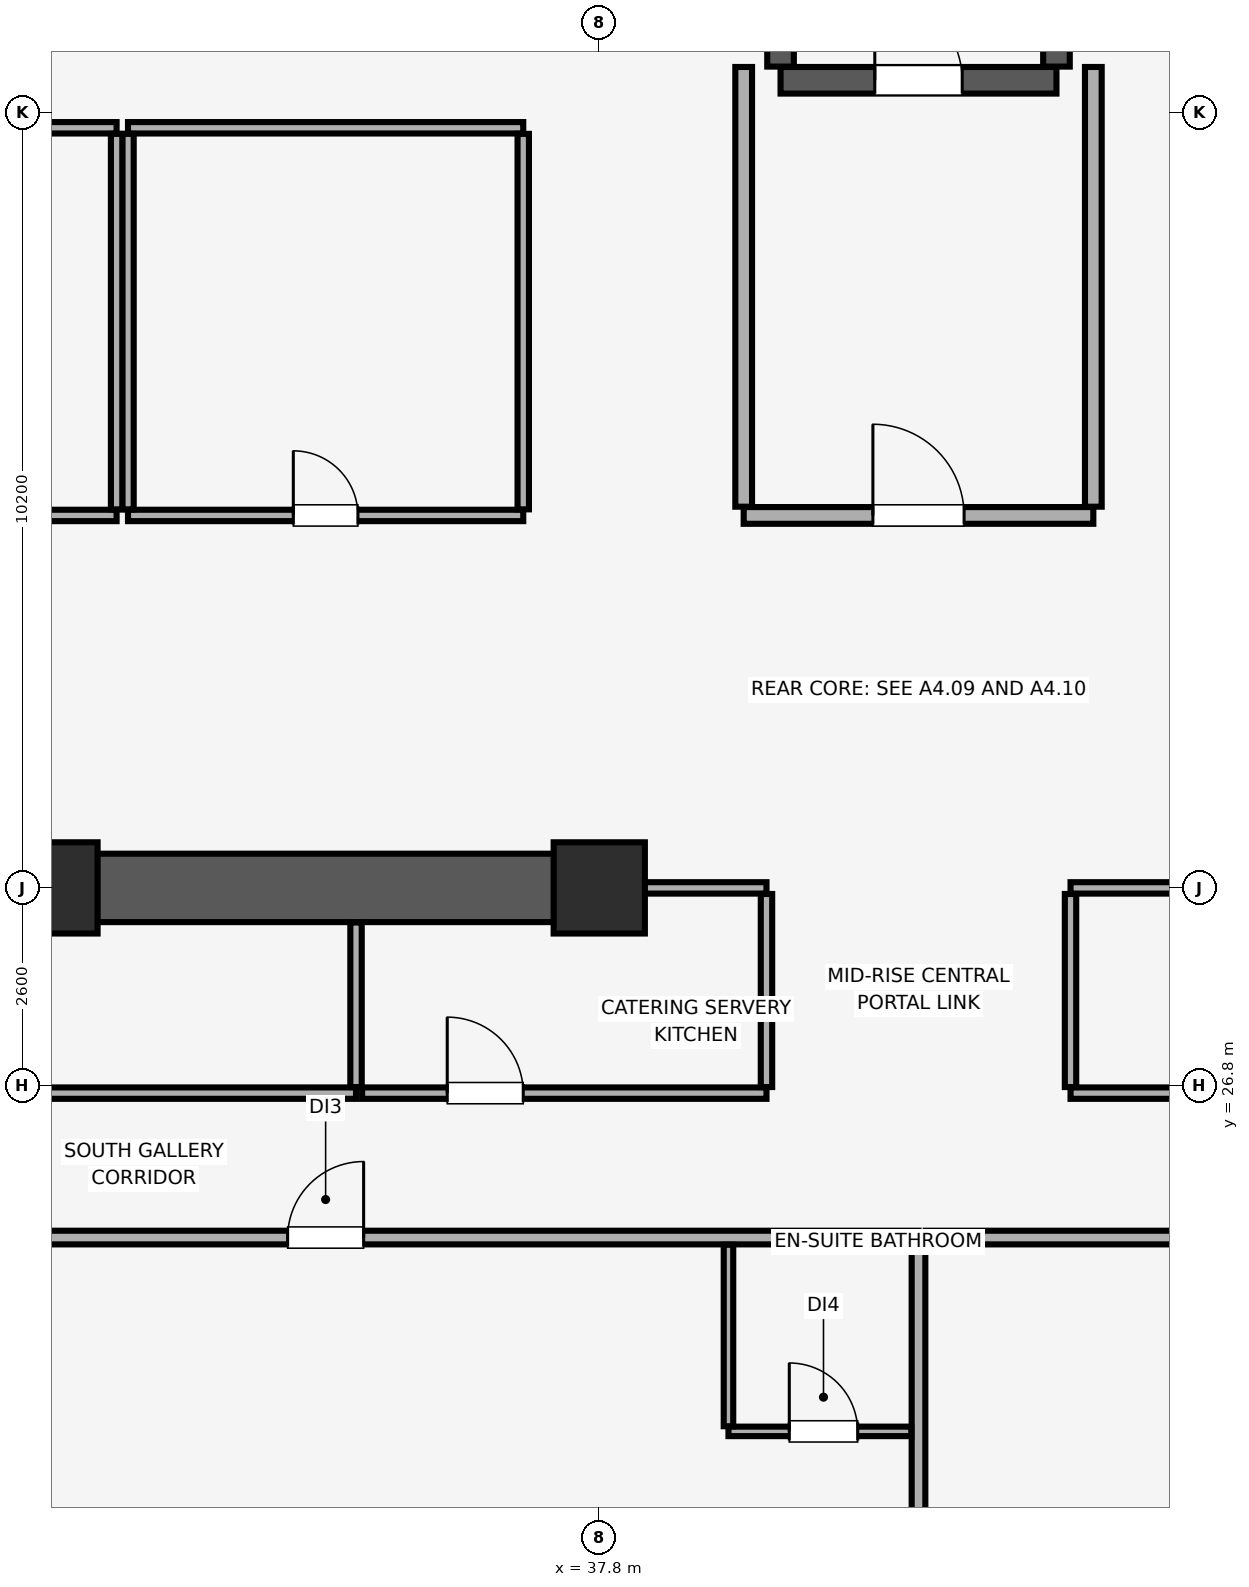
"""IFC4 building model, lengths in metres.
Left out: names, types, materials, properties, quantities, classifications, styles, units other than length and angle.
Written with IfcOpenShell. Run it as: python <this file> out.ifc"""

import sys

from ifc_helpers import new_model, si_unit, direction, frame, frame_2d, origin, origin_2d, place, context, subcontext, project, spatial, rectangle, extrude, element, fill, save


model = new_model("IFC4")
c1 = context("Model", 3, precision=1e-05, world=origin(), true_north=direction((0.0, 1.0)))
c2 = subcontext(c1, "Body", "Model", "MODEL_VIEW")
j1 = project(units=[si_unit("LENGTHUNIT", "METRE"), si_unit("PLANEANGLEUNIT", "RADIAN")], contexts=[c1])
p1 = place(None, origin())
s1 = spatial("IfcSite", under=j1, at=p1, CompositionType="ELEMENT")
p2 = place(p1, origin())
s2 = spatial("IfcBuilding", under=s1, at=p2, CompositionType="ELEMENT")
p3 = place(p2, frame((0.0, 0.0, 220.55)))
s3 = spatial("IfcBuildingStorey", under=s2, at=p3, CompositionType="ELEMENT", Elevation=220.55)
for number, where, z_axis, x_axis in (
    (1, (30.6, 29.4, 0.0), (0.0, 0.0, 1.0), (1.0, 0.0, 0.0)),
    (2, (37.8, 29.4, 0.0), (0.0, 0.0, 1.0), (1.0, 0.0, 0.0)),
):
    element("IfcColumn", number, at=place(p3, frame(where, z_axis=z_axis, x_axis=x_axis)), inside=s3, PredefinedType="COLUMN", context=c2, shape_type="SweptSolid", body=[
        extrude(rectangle(XDim=1.2, YDim=1.2, at=origin_2d()), origin(), (0.0, 0.0, 1.0), 3.56),
    ])
p4 = place(p3, frame((30.4, 29.4, 0.0), z_axis=(0.0, 0.0, 1.0), x_axis=(1.0, 0.0, 0.0)))
e3 = element("IfcWall", 3, at=p4, inside=s3, PredefinedType="SHEAR", context=c2, shape_type="SweptSolid", body=[
    extrude(rectangle(XDim=7.6, YDim=0.9, at=frame_2d((3.8, 0.0))), origin(), (0.0, 0.0, 1.0), 3.56),
])
p5 = place(p3, frame((40.185, 40.025, 0.0), z_axis=(0.0, 0.0, 1.0), x_axis=(1.0, 0.0, 0.0)))
e4 = element("IfcWall", 4, at=p5, inside=s3, PredefinedType="SHEAR", context=c2, shape_type="SweptSolid", body=[
    extrude(rectangle(XDim=3.63, YDim=0.35, at=frame_2d((1.815, 0.0))), origin(), (0.0, 0.0, 1.0), 3.56),
])
p6 = place(p5, frame((1.24, 0.0, 0.0)))
e5 = element("IfcOpeningElement", 5, at=p6, cuts=e4, PredefinedType="OPENING", context=c2, shape_type="SweptSolid", body=[
    extrude(rectangle(XDim=1.15, YDim=2.15, at=frame_2d((0.575, 1.075))), frame((0.0, 0.185, 0.0), z_axis=(0.0, -1.0, 0.0), x_axis=(1.0, 0.0, 0.0)), (0.0, 0.0, 1.0), 0.37),
])
for number, where, z_axis, x_axis in (
    (6, (40.185, 40.205, 0.0), (0.0, 0.0, 1.0), (0.0, 1.0, 0.0)),
    (7, (43.815, 40.205, 0.0), (0.0, 0.0, 1.0), (0.0, 1.0, 0.0)),
):
    element("IfcWall", number, at=place(p3, frame(where, z_axis=z_axis, x_axis=x_axis)), inside=s3, PredefinedType="SHEAR", context=c2, shape_type="SweptSolid", body=[
        extrude(rectangle(XDim=8.09, YDim=0.35, at=frame_2d((4.045, 0.0))), origin(), (0.0, 0.0, 1.0), 3.56),
    ])
p7 = place(p3, frame((39.7, 34.3, 0.0), z_axis=(0.0, 0.0, 1.0), x_axis=(1.0, 0.0, 0.0)))
e8 = element("IfcWall", 8, at=p7, inside=s3, PredefinedType="PARTITIONING", context=c2, shape_type="SweptSolid", body=[
    extrude(rectangle(XDim=4.6, YDim=0.22, at=frame_2d((2.3, 0.0))), origin(), (0.0, 0.0, 1.0), 3.56),
])
p8 = place(p7, frame((1.7, 0.0, 0.0)))
e9 = element("IfcOpeningElement", 9, at=p8, cuts=e8, PredefinedType="OPENING", context=c2, shape_type="SweptSolid", body=[
    extrude(rectangle(XDim=1.2, YDim=2.15, at=frame_2d((0.6, 1.075))), frame((0.0, 0.12, 0.0), z_axis=(0.0, -1.0, 0.0), x_axis=(1.0, 0.0, 0.0)), (0.0, 0.0, 1.0), 0.24),
])
for number, where, z_axis, x_axis in (
    (10, (39.7, 34.415, 0.0), (0.0, 0.0, 1.0), (0.0, 1.0, 0.0)),
    (11, (44.3, 34.415, 0.0), (0.0, 0.0, 1.0), (0.0, 1.0, 0.0)),
):
    element("IfcWall", number, at=place(p3, frame(where, z_axis=z_axis, x_axis=x_axis)), inside=s3, PredefinedType="PARTITIONING", context=c2, shape_type="SweptSolid", body=[
        extrude(rectangle(XDim=5.785, YDim=0.22, at=frame_2d((2.893, 0.0))), origin(), (0.0, 0.0, 1.0), 3.56),
    ])
p9 = place(p3, frame((31.6, 34.3, 0.0), z_axis=(0.0, 0.0, 1.0), x_axis=(1.0, 0.0, 0.0)))
e12 = element("IfcWall", 12, at=p9, inside=s3, PredefinedType="PARTITIONING", context=c2, shape_type="SweptSolid", body=[
    extrude(rectangle(XDim=5.2, YDim=0.15, at=frame_2d((2.6, 0.0))), origin(), (0.0, 0.0, 1.0), 3.56),
])
p10 = place(p9, frame((2.175, 0.0, 0.0)))
e13 = element("IfcOpeningElement", 13, at=p10, cuts=e12, PredefinedType="OPENING", context=c2, shape_type="SweptSolid", body=[
    extrude(rectangle(XDim=0.85, YDim=2.1, at=frame_2d((0.425, 1.05))), frame((0.0, 0.085, 0.0), z_axis=(0.0, -1.0, 0.0), x_axis=(1.0, 0.0, 0.0)), (0.0, 0.0, 1.0), 0.17),
])
p11 = place(p3, frame((31.6, 39.4, 0.0), z_axis=(0.0, 0.0, 1.0), x_axis=(1.0, 0.0, 0.0)))
e14 = element("IfcWall", 14, at=p11, inside=s3, PredefinedType="PARTITIONING", context=c2, shape_type="SweptSolid", body=[
    extrude(rectangle(XDim=5.2, YDim=0.15, at=frame_2d((2.6, 0.0))), origin(), (0.0, 0.0, 1.0), 3.56),
])
for number, where, z_axis, x_axis in (
    (15, (31.6, 34.38, 0.0), (0.0, 0.0, 1.0), (0.0, 1.0, 0.0)),
    (16, (36.8, 34.38, 0.0), (0.0, 0.0, 1.0), (0.0, 1.0, 0.0)),
):
    element("IfcWall", number, at=place(p3, frame(where, z_axis=z_axis, x_axis=x_axis)), inside=s3, PredefinedType="PARTITIONING", context=c2, shape_type="SweptSolid", body=[
        extrude(rectangle(XDim=4.94, YDim=0.15, at=frame_2d((2.47, 0.0))), origin(), (0.0, 0.0, 1.0), 3.56),
    ])
p12 = place(p3, frame((23.8, 34.3, 0.0), z_axis=(0.0, 0.0, 1.0), x_axis=(1.0, 0.0, 0.0)))
e17 = element("IfcWall", 17, at=p12, inside=s3, PredefinedType="PARTITIONING", context=c2, shape_type="SweptSolid", body=[
    extrude(rectangle(XDim=7.65, YDim=0.15, at=frame_2d((3.825, 0.0))), origin(), (0.0, 0.0, 1.0), 3.56),
])
p13 = place(p12, frame((3.3, 0.0, 0.0)))
e18 = element("IfcOpeningElement", 18, at=p13, cuts=e17, PredefinedType="OPENING", context=c2, shape_type="SweptSolid", body=[
    extrude(rectangle(XDim=1.0, YDim=2.15, at=frame_2d((0.5, 1.075))), frame((0.0, 0.085, 0.0), z_axis=(0.0, -1.0, 0.0), x_axis=(1.0, 0.0, 0.0)), (0.0, 0.0, 1.0), 0.17),
])
p14 = place(p3, frame((23.8, 39.4, 0.0), z_axis=(0.0, 0.0, 1.0), x_axis=(1.0, 0.0, 0.0)))
e19 = element("IfcWall", 19, at=p14, inside=s3, PredefinedType="PARTITIONING", context=c2, shape_type="SweptSolid", body=[
    extrude(rectangle(XDim=7.65, YDim=0.15, at=frame_2d((3.825, 0.0))), origin(), (0.0, 0.0, 1.0), 3.56),
])
p15 = place(p3, frame((31.45, 34.38, 0.0), z_axis=(0.0, 0.0, 1.0), x_axis=(0.0, 1.0, 0.0)))
e20 = element("IfcWall", 20, at=p15, inside=s3, PredefinedType="PARTITIONING", context=c2, shape_type="SweptSolid", body=[
    extrude(rectangle(XDim=4.94, YDim=0.15, at=frame_2d((2.47, 0.0))), origin(), (0.0, 0.0, 1.0), 3.56),
])
p16 = place(p3, frame((28.195, 24.8, 0.0), z_axis=(0.0, 0.0, 1.0), x_axis=(1.0, 0.0, 0.0)))
e21 = element("IfcWall", 21, at=p16, inside=s3, PredefinedType="PARTITIONING", context=c2, shape_type="SweptSolid", body=[
    extrude(rectangle(XDim=13.805, YDim=0.18, at=frame_2d((6.902, 0.0))), origin(), (0.0, 0.0, 1.0), 3.56),
])
p17 = place(p16, frame((5.505, 0.0, 0.0)))
e22 = element("IfcOpeningElement", 22, at=p17, cuts=e21, PredefinedType="OPENING", context=c2, shape_type="SweptSolid", body=[
    extrude(rectangle(XDim=1.0, YDim=2.15, at=frame_2d((0.5, 1.075))), frame((0.0, 0.1, 0.0), z_axis=(0.0, -1.0, 0.0), x_axis=(1.0, 0.0, 0.0)), (0.0, 0.0, 1.0), 0.2),
])
p18 = place(p3, frame((42.0, 3.15, 0.0), z_axis=(0.0, 0.0, 1.0), x_axis=(0.0, 1.0, 0.0)))
e23 = element("IfcWall", 23, at=p18, inside=s3, PredefinedType="PARTITIONING", context=c2, shape_type="SweptSolid", body=[
    extrude(rectangle(XDim=21.555, YDim=0.18, at=frame_2d((10.778, 0.0))), origin(), (0.0, 0.0, 1.0), 2.96),
])
p19 = place(p3, frame((39.5, 22.25, 0.0), z_axis=(0.0, 0.0, 1.0), x_axis=(1.0, 0.0, 0.0)))
e24 = element("IfcWall", 24, at=p19, inside=s3, PredefinedType="PARTITIONING", context=c2, shape_type="SweptSolid", body=[
    extrude(rectangle(XDim=2.405, YDim=0.125, at=frame_2d((1.203, 0.0))), origin(), (0.0, 0.0, 1.0), 3.56),
])
p20 = place(p19, frame((0.8, 0.0, 0.0)))
e25 = element("IfcOpeningElement", 25, at=p20, cuts=e24, PredefinedType="OPENING", context=c2, shape_type="SweptSolid", body=[
    extrude(rectangle(XDim=0.9, YDim=2.1, at=frame_2d((0.45, 1.05))), frame((0.0, 0.073, 0.0), z_axis=(0.0, -1.0, 0.0), x_axis=(1.0, 0.0, 0.0)), (0.0, 0.0, 1.0), 0.145),
])
p21 = place(p3, frame((39.5, 22.317, 0.0), z_axis=(0.0, 0.0, 1.0), x_axis=(0.0, 1.0, 0.0)))
e26 = element("IfcWall", 26, at=p21, inside=s3, PredefinedType="PARTITIONING", context=c2, shape_type="SweptSolid", body=[
    extrude(rectangle(XDim=2.388, YDim=0.125, at=frame_2d((1.194, 0.0))), origin(), (0.0, 0.0, 1.0), 3.56),
])
p22 = place(p3, frame((42.095, 24.8, 0.0), z_axis=(0.0, 0.0, 1.0), x_axis=(1.0, 0.0, 0.0)))
e27 = element("IfcWall", 27, at=p22, inside=s3, PredefinedType="PARTITIONING", context=c2, shape_type="SweptSolid", body=[
    extrude(rectangle(XDim=13.805, YDim=0.18, at=frame_2d((6.902, 0.0))), origin(), (0.0, 0.0, 1.0), 3.56),
])
p23 = place(p22, frame((7.145, 0.0, 0.0)))
e28 = element("IfcOpeningElement", 28, at=p23, cuts=e27, PredefinedType="OPENING", context=c2, shape_type="SweptSolid", body=[
    extrude(rectangle(XDim=1.0, YDim=2.15, at=frame_2d((0.5, 1.075))), frame((0.0, 0.1, 0.0), z_axis=(0.0, -1.0, 0.0), x_axis=(1.0, 0.0, 0.0)), (0.0, 0.0, 1.0), 0.2),
])
p24 = place(p3, frame((16.0, 26.7, 0.0), z_axis=(0.0, 0.0, 1.0), x_axis=(1.0, 0.0, 0.0)))
e29 = element("IfcWall", 29, at=p24, inside=s3, PredefinedType="PARTITIONING", context=c2, shape_type="SweptSolid", body=[
    extrude(rectangle(XDim=18.6, YDim=0.15, at=frame_2d((9.3, 0.0))), origin(), (0.0, 0.0, 1.0), 3.56),
])
p25 = place(p24, frame((8.8, 0.0, 0.0)))
e30 = element("IfcOpeningElement", 30, at=p25, cuts=e29, PredefinedType="OPENING", context=c2, shape_type="SweptSolid", body=[
    extrude(rectangle(XDim=1.0, YDim=2.15, at=frame_2d((0.5, 1.075))), frame((0.0, 0.085, 0.0), z_axis=(0.0, -1.0, 0.0), x_axis=(1.0, 0.0, 0.0)), (0.0, 0.0, 1.0), 0.17),
])
p26 = place(p3, frame((34.6, 26.78, 0.0), z_axis=(0.0, 0.0, 1.0), x_axis=(0.0, 1.0, 0.0)))
e31 = element("IfcWall", 31, at=p26, inside=s3, PredefinedType="PARTITIONING", context=c2, shape_type="SweptSolid", body=[
    extrude(rectangle(XDim=2.165, YDim=0.15, at=frame_2d((1.083, 0.0))), origin(), (0.0, 0.0, 1.0), 3.56),
])
p27 = place(p3, frame((34.68, 26.7, 0.0), z_axis=(0.0, 0.0, 1.0), x_axis=(1.0, 0.0, 0.0)))
e32 = element("IfcWall", 32, at=p27, inside=s3, PredefinedType="PARTITIONING", context=c2, shape_type="SweptSolid", body=[
    extrude(rectangle(XDim=5.32, YDim=0.15, at=frame_2d((2.66, 0.0))), origin(), (0.0, 0.0, 1.0), 3.56),
])
p28 = place(p27, frame((1.12, 0.0, 0.0)))
e33 = element("IfcOpeningElement", 33, at=p28, cuts=e32, PredefinedType="OPENING", context=c2, shape_type="SweptSolid", body=[
    extrude(rectangle(XDim=1.0, YDim=2.15, at=frame_2d((0.5, 1.075))), frame((0.0, 0.085, 0.0), z_axis=(0.0, -1.0, 0.0), x_axis=(1.0, 0.0, 0.0)), (0.0, 0.0, 1.0), 0.17),
])
p29 = place(p3, frame((38.01, 29.4, 0.0), z_axis=(0.0, 0.0, 1.0), x_axis=(1.0, 0.0, 0.0)))
e34 = element("IfcWall", 34, at=p29, inside=s3, PredefinedType="PARTITIONING", context=c2, shape_type="SweptSolid", body=[
    extrude(rectangle(XDim=1.99, YDim=0.15, at=frame_2d((0.995, 0.0))), origin(), (0.0, 0.0, 1.0), 2.46),
])
p30 = place(p3, frame((40.0, 26.78, 0.0), z_axis=(0.0, 0.0, 1.0), x_axis=(0.0, 1.0, 0.0)))
e35 = element("IfcWall", 35, at=p30, inside=s3, PredefinedType="PARTITIONING", context=c2, shape_type="SweptSolid", body=[
    extrude(rectangle(XDim=2.54, YDim=0.15, at=frame_2d((1.27, 0.0))), origin(), (0.0, 0.0, 1.0), 3.56),
])
p31 = place(p3, frame((44.0, 26.7, 0.0), z_axis=(0.0, 0.0, 1.0), x_axis=(1.0, 0.0, 0.0)))
e36 = element("IfcWall", 36, at=p31, inside=s3, PredefinedType="PARTITIONING", context=c2, shape_type="SweptSolid", body=[
    extrude(rectangle(XDim=12.0, YDim=0.15, at=frame_2d((6.0, 0.0))), origin(), (0.0, 0.0, 1.0), 3.56),
])
p32 = place(p31, frame((5.5, 0.0, 0.0)))
e37 = element("IfcOpeningElement", 37, at=p32, cuts=e36, PredefinedType="OPENING", context=c2, shape_type="SweptSolid", body=[
    extrude(rectangle(XDim=1.0, YDim=2.15, at=frame_2d((0.5, 1.075))), frame((0.0, 0.085, 0.0), z_axis=(0.0, -1.0, 0.0), x_axis=(1.0, 0.0, 0.0)), (0.0, 0.0, 1.0), 0.17),
])
p33 = place(p3, frame((44.0, 29.4, 0.0), z_axis=(0.0, 0.0, 1.0), x_axis=(1.0, 0.0, 0.0)))
e38 = element("IfcWall", 38, at=p33, inside=s3, PredefinedType="PARTITIONING", context=c2, shape_type="SweptSolid", body=[
    extrude(rectangle(XDim=1.99, YDim=0.15, at=frame_2d((0.995, 0.0))), origin(), (0.0, 0.0, 1.0), 2.46),
])
p34 = place(p3, frame((44.0, 26.78, 0.0), z_axis=(0.0, 0.0, 1.0), x_axis=(0.0, 1.0, 0.0)))
e39 = element("IfcWall", 39, at=p34, inside=s3, PredefinedType="PARTITIONING", context=c2, shape_type="SweptSolid", body=[
    extrude(rectangle(XDim=2.54, YDim=0.15, at=frame_2d((1.27, 0.0))), origin(), (0.0, 0.0, 1.0), 3.56),
])
p35 = place(p6, origin())
e40 = element("IfcDoor", 40, at=p35, inside=s3, OperationType="SINGLE_SWING_LEFT", PredefinedType="DOOR", context=c2, shape_type="SweptSolid", body=[
    extrude(rectangle(XDim=1.15, YDim=2.15, at=frame_2d((0.575, 1.075))), frame((0.0, 0.025, 0.0), z_axis=(0.0, -1.0, 0.0), x_axis=(1.0, 0.0, 0.0)), (0.0, 0.0, 1.0), 0.05),
])
fill(e5, e40)
p36 = place(p8, origin())
e41 = element("IfcDoor", 41, at=p36, inside=s3, OperationType="SINGLE_SWING_LEFT", PredefinedType="DOOR", context=c2, shape_type="SweptSolid", body=[
    extrude(rectangle(XDim=1.2, YDim=2.15, at=frame_2d((0.6, 1.075))), frame((0.0, 0.025, 0.0), z_axis=(0.0, -1.0, 0.0), x_axis=(1.0, 0.0, 0.0)), (0.0, 0.0, 1.0), 0.05),
])
fill(e9, e41)
p37 = place(p10, origin())
e42 = element("IfcDoor", 42, at=p37, inside=s3, OperationType="SINGLE_SWING_LEFT", PredefinedType="DOOR", context=c2, shape_type="SweptSolid", body=[
    extrude(rectangle(XDim=0.85, YDim=2.1, at=frame_2d((0.425, 1.05))), frame((0.0, 0.025, 0.0), z_axis=(0.0, -1.0, 0.0), x_axis=(1.0, 0.0, 0.0)), (0.0, 0.0, 1.0), 0.05),
])
fill(e13, e42)
p38 = place(p17, origin())
e43 = element("IfcDoor", 43, at=p38, inside=s3, OperationType="SINGLE_SWING_RIGHT", PredefinedType="DOOR", context=c2, shape_type="SweptSolid", body=[
    extrude(rectangle(XDim=1.0, YDim=2.15, at=frame_2d((0.5, 1.075))), frame((0.0, 0.025, 0.0), z_axis=(0.0, -1.0, 0.0), x_axis=(1.0, 0.0, 0.0)), (0.0, 0.0, 1.0), 0.05),
])
fill(e22, e43)
p39 = place(p20, origin())
e44 = element("IfcDoor", 44, at=p39, inside=s3, OperationType="SINGLE_SWING_LEFT", PredefinedType="DOOR", context=c2, shape_type="SweptSolid", body=[
    extrude(rectangle(XDim=0.9, YDim=2.1, at=frame_2d((0.45, 1.05))), frame((0.0, 0.025, 0.0), z_axis=(0.0, -1.0, 0.0), x_axis=(1.0, 0.0, 0.0)), (0.0, 0.0, 1.0), 0.05),
])
fill(e25, e44)
p40 = place(p28, origin())
e45 = element("IfcDoor", 45, at=p40, inside=s3, OperationType="SINGLE_SWING_LEFT", PredefinedType="DOOR", context=c2, shape_type="SweptSolid", body=[
    extrude(rectangle(XDim=1.0, YDim=2.15, at=frame_2d((0.5, 1.075))), frame((0.0, 0.025, 0.0), z_axis=(0.0, -1.0, 0.0), x_axis=(1.0, 0.0, 0.0)), (0.0, 0.0, 1.0), 0.05),
])
fill(e33, e45)
save(model, sys.argv[1])
